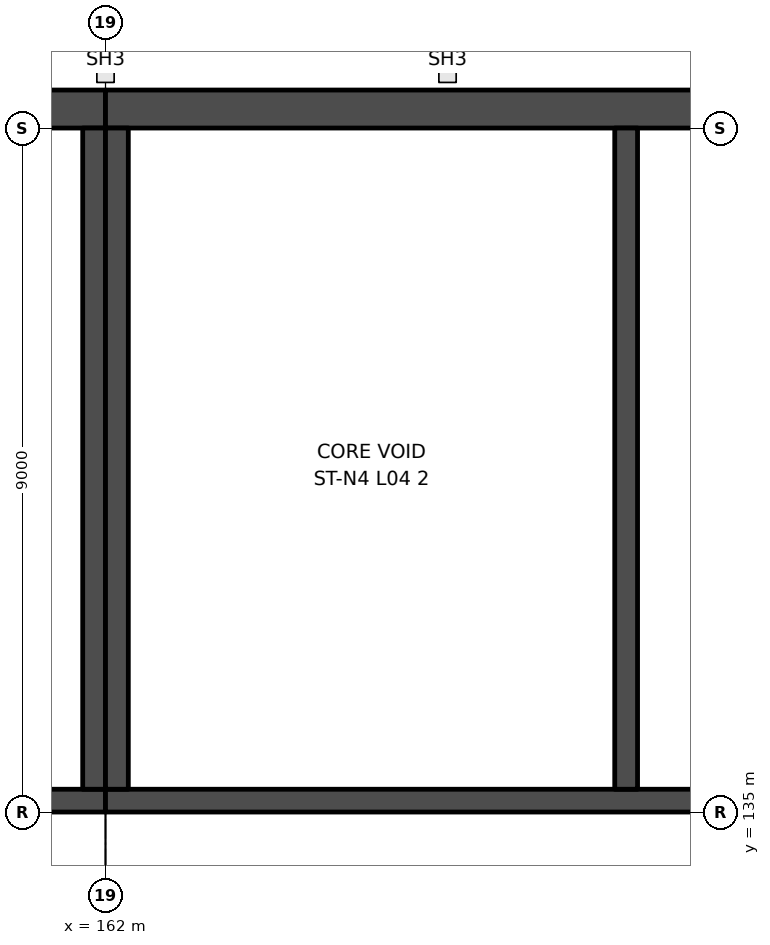
"""IFC4 building model, lengths in metres.
Left out: names, types, materials, properties, quantities, classifications, styles, units other than length and angle.
Written with IfcOpenShell. Run it as: python <this file> out.ifc"""

import sys

from ifc_helpers import new_model, si_unit, direction, frame, frame_2d, origin, place, context, subcontext, project, spatial, rectangle, extrude, element, save


model = new_model("IFC4")
c1 = context("Model", 3, precision=1e-05, world=origin(), true_north=direction((0.0, 1.0)))
c2 = subcontext(c1, "Body", "Model", "MODEL_VIEW")
j1 = project(units=[si_unit("LENGTHUNIT", "METRE"), si_unit("PLANEANGLEUNIT", "RADIAN")], contexts=[c1])
p1 = place(None, origin())
s1 = spatial("IfcSite", under=j1, at=p1, CompositionType="ELEMENT")
p2 = place(p1, origin())
s2 = spatial("IfcBuilding", under=s1, at=p2, CompositionType="ELEMENT")
p3 = place(p2, frame((0.0, 0.0, 28.0)))
s3 = spatial("IfcBuildingStorey", under=s2, at=p3, CompositionType="ELEMENT", Elevation=28.0)
p4 = place(p3, frame((144.0, 135.15, 0.0), z_axis=(0.0, 0.0, 1.0), x_axis=(1.0, 0.0, 0.0)))
e1 = element("IfcWall", 1, at=p4, inside=s3, PredefinedType="SHEAR", context=c2, shape_type="SweptSolid", body=[
    extrude(rectangle(XDim=18.0, YDim=0.3, at=frame_2d((9.0, 0.0))), origin(), (0.0, 0.0, 1.0), 5.5),
])
p5 = place(p4, frame((1.5, 0.0, 0.0)))
e2 = element("IfcOpeningElement", 2, at=p5, cuts=e1, PredefinedType="OPENING", context=c2, shape_type="SweptSolid", body=[
    extrude(rectangle(XDim=1.2, YDim=2.1, at=frame_2d((0.6, 1.05))), frame((0.0, 0.16, 0.0), z_axis=(0.0, -1.0, 0.0), x_axis=(1.0, 0.0, 0.0)), (0.0, 0.0, 1.0), 0.32),
])
p6 = place(p3, frame((144.0, 144.25, 0.0), z_axis=(0.0, 0.0, 1.0), x_axis=(1.0, 0.0, 0.0)))
e3 = element("IfcWall", 3, at=p6, inside=s3, PredefinedType="SHEAR", context=c2, shape_type="SweptSolid", body=[
    extrude(rectangle(XDim=18.0, YDim=0.5, at=frame_2d((9.0, 0.0))), origin(), (0.0, 0.0, 1.0), 5.5),
])
p7 = place(p3, frame((161.85, 135.3, 0.0), z_axis=(0.0, 0.0, 1.0), x_axis=(0.0, 1.0, 0.0)))
e4 = element("IfcWall", 4, at=p7, inside=s3, PredefinedType="SHEAR", context=c2, shape_type="SweptSolid", body=[
    extrude(rectangle(XDim=8.7, YDim=0.3, at=frame_2d((4.35, 0.0))), origin(), (0.0, 0.0, 1.0), 5.5),
])
p8 = place(p3, frame((180.0, 135.15, 0.0), z_axis=(0.0, 0.0, 1.0), x_axis=(-1.0, 0.0, 0.0)))
e5 = element("IfcWall", 5, at=p8, inside=s3, PredefinedType="SHEAR", context=c2, shape_type="SweptSolid", body=[
    extrude(rectangle(XDim=18.0, YDim=0.3, at=frame_2d((9.0, 0.0))), origin(), (0.0, 0.0, 1.0), 5.5),
])
p9 = place(p8, frame((8.6, 0.0, 0.0)))
e6 = element("IfcOpeningElement", 6, at=p9, cuts=e5, PredefinedType="OPENING", context=c2, shape_type="SweptSolid", body=[
    extrude(rectangle(XDim=1.2, YDim=2.1, at=frame_2d((0.6, 1.05))), frame((0.0, 0.16, 0.0), z_axis=(0.0, -1.0, 0.0), x_axis=(1.0, 0.0, 0.0)), (0.0, 0.0, 1.0), 0.32),
])
p10 = place(p3, frame((180.0, 144.25, 0.0), z_axis=(0.0, 0.0, 1.0), x_axis=(-1.0, 0.0, 0.0)))
e7 = element("IfcWall", 7, at=p10, inside=s3, PredefinedType="SHEAR", context=c2, shape_type="SweptSolid", body=[
    extrude(rectangle(XDim=18.0, YDim=0.5, at=frame_2d((9.0, 0.0))), origin(), (0.0, 0.0, 1.0), 5.5),
])
for number, where, z_axis, x_axis in (
    (8, (162.15, 135.3, 0.0), (0.0, 0.0, 1.0), (0.0, 1.0, 0.0)),
    (9, (168.85, 135.3, 0.0), (0.0, 0.0, 1.0), (0.0, 1.0, 0.0)),
):
    element("IfcWall", number, at=place(p3, frame(where, z_axis=z_axis, x_axis=x_axis)), inside=s3, PredefinedType="SHEAR", context=c2, shape_type="SweptSolid", body=[
        extrude(rectangle(XDim=8.7, YDim=0.3, at=frame_2d((4.35, 0.0))), origin(), (0.0, 0.0, 1.0), 5.5),
    ])
save(model, sys.argv[1])
